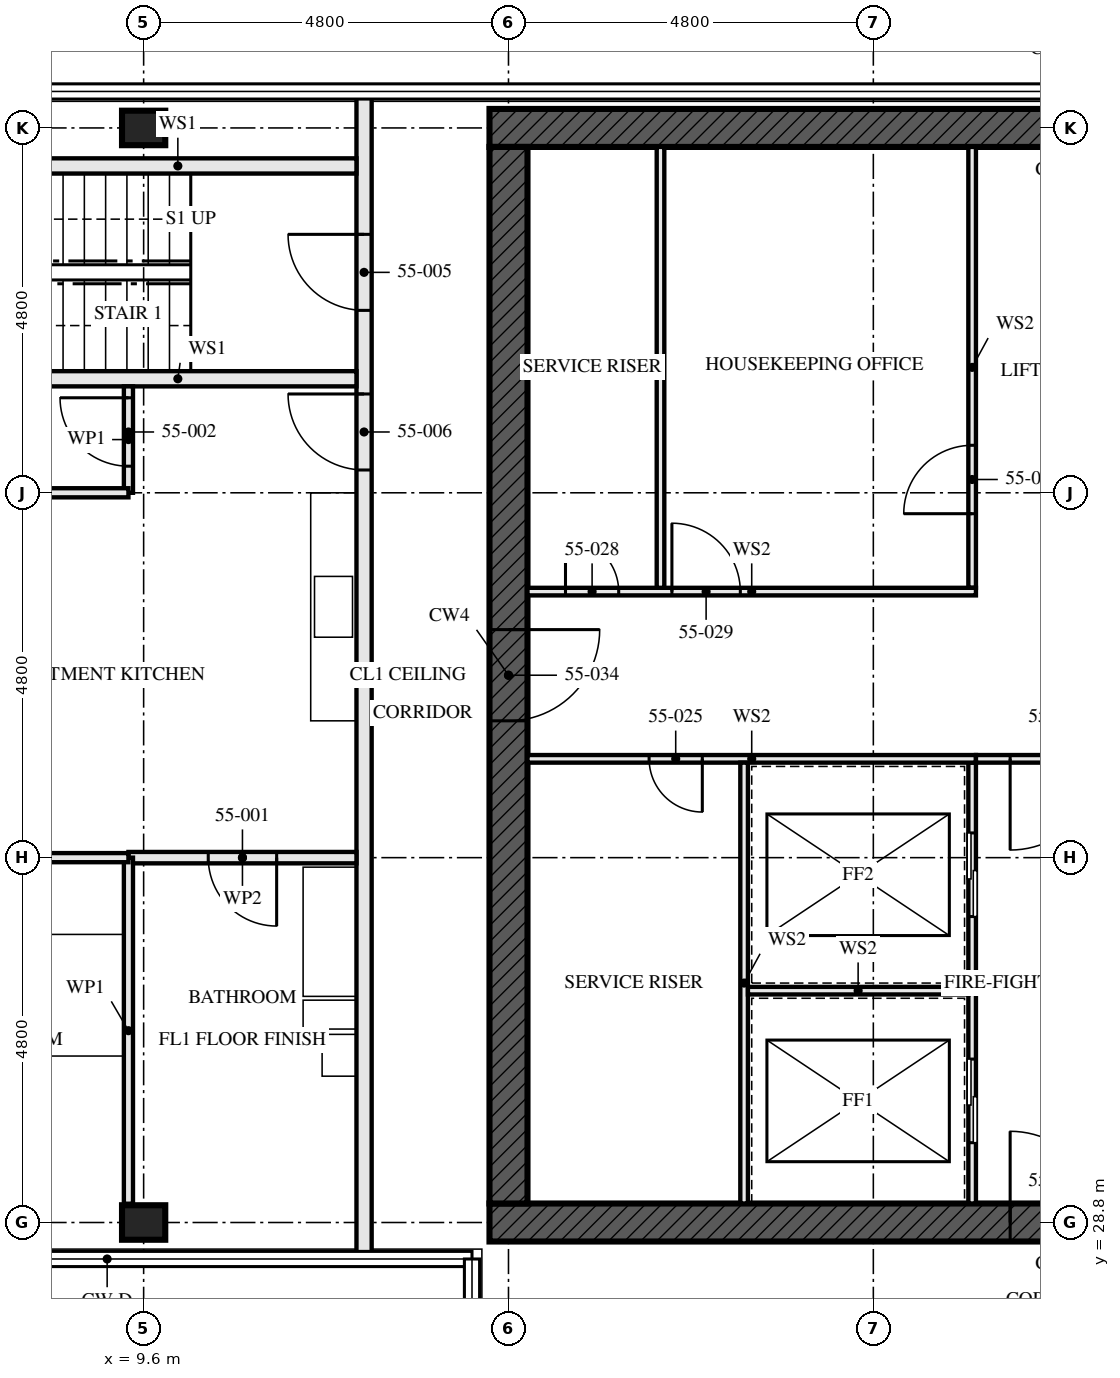
"""IFC4 building model, lengths in metres.
Left out: names, types, materials, properties, quantities, classifications, styles, units other than length and angle.
Written with IfcOpenShell. Run it as: python <this file> out.ifc"""

import sys

from ifc_helpers import new_model, si_unit, direction, frame, frame_2d, origin, origin_2d, place, context, subcontext, project, spatial, rectangle, i_section, extrude, element, fill, save


model = new_model("IFC4")
c1 = context("Model", 3, precision=1e-05, world=origin(), true_north=direction((0.0, 1.0)))
c2 = subcontext(c1, "Body", "Model", "MODEL_VIEW")
j1 = project(units=[si_unit("LENGTHUNIT", "METRE"), si_unit("PLANEANGLEUNIT", "RADIAN")], contexts=[c1])
p1 = place(None, origin())
s1 = spatial("IfcSite", under=j1, at=p1, CompositionType="ELEMENT")
p2 = place(p1, origin())
s2 = spatial("IfcBuilding", under=s1, at=p2, CompositionType="ELEMENT")
p3 = place(p2, frame((0.0, 0.0, 201.5)))
s3 = spatial("IfcBuildingStorey", under=s2, at=p3, CompositionType="ELEMENT", Elevation=201.5)
for number, where, z_axis, x_axis in (
    (1, (9.6, 28.8, 0.0), (0.0, 0.0, 1.0), (0.0, 1.0, 0.0)),
    (2, (9.6, 43.2, 0.0), (0.0, 0.0, 1.0), (0.0, 1.0, 0.0)),
):
    element("IfcColumn", number, at=place(p3, frame(where, z_axis=z_axis, x_axis=x_axis)), inside=s3, PredefinedType="COLUMN", context=c2, shape_type="SweptSolid", body=[
        extrude(i_section(OverallWidth=0.454, OverallDepth=0.569, WebThickness=0.078, FlangeThickness=0.125, FilletRadius=0.015, at=origin_2d()), origin(), (0.0, 0.0, 1.0), 3.5),
    ])
p4 = place(p3, frame((14.15, 28.8, -0.17), z_axis=(0.0, 0.0, 1.0), x_axis=(1.0, 0.0, 0.0)))
e3 = element("IfcWall", 3, at=p4, inside=s3, PredefinedType="SHEAR", context=c2, shape_type="SweptSolid", body=[
    extrude(rectangle(XDim=14.9, YDim=0.5, at=frame_2d((7.45, 0.0))), origin(), (0.0, 0.0, 1.0), 3.5),
])
p5 = place(p4, frame((6.85, 0.0, 0.17)))
e4 = element("IfcOpeningElement", 4, at=p5, cuts=e3, PredefinedType="OPENING", context=c2, shape_type="SweptSolid", body=[
    extrude(rectangle(XDim=1.2, YDim=2.1, at=frame_2d((0.6, 1.05))), frame((0.0, 0.26, 0.0), z_axis=(0.0, -1.0, 0.0), x_axis=(1.0, 0.0, 0.0)), (0.0, 0.0, 1.0), 0.521),
])
p6 = place(p3, frame((29.05, 43.2, -0.17), z_axis=(0.0, 0.0, 1.0), x_axis=(-1.0, 0.0, 0.0)))
e5 = element("IfcWall", 5, at=p6, inside=s3, PredefinedType="SHEAR", context=c2, shape_type="SweptSolid", body=[
    extrude(rectangle(XDim=14.9, YDim=0.5, at=frame_2d((7.45, 0.0))), origin(), (0.0, 0.0, 1.0), 3.5),
])
p7 = place(p3, frame((14.4, 42.95, -0.17), z_axis=(0.0, 0.0, 1.0), x_axis=(0.0, -1.0, 0.0)))
e6 = element("IfcWall", 6, at=p7, inside=s3, PredefinedType="SHEAR", context=c2, shape_type="SweptSolid", body=[
    extrude(rectangle(XDim=13.9, YDim=0.5, at=frame_2d((6.95, 0.0))), origin(), (0.0, 0.0, 1.0), 3.5),
])
p8 = place(p7, frame((6.35, 0.0, 0.17)))
e7 = element("IfcOpeningElement", 7, at=p8, cuts=e6, PredefinedType="OPENING", context=c2, shape_type="SweptSolid", body=[
    extrude(rectangle(XDim=1.2, YDim=2.1, at=frame_2d((0.6, 1.05))), frame((0.0, 0.26, 0.0), z_axis=(0.0, -1.0, 0.0), x_axis=(1.0, 0.0, 0.0)), (0.0, 0.0, 1.0), 0.521),
])
for number, where, z_axis, x_axis in (
    (8, (7.7, 42.7, 0.0), (0.0, 0.0, 1.0), (1.0, 0.0, 0.0)),
    (9, (7.7, 39.9, 0.0), (0.0, 0.0, 1.0), (1.0, 0.0, 0.0)),
):
    element("IfcWall", number, at=place(p3, frame(where, z_axis=z_axis, x_axis=x_axis)), inside=s3, PredefinedType="SOLIDWALL", context=c2, shape_type="SweptSolid", body=[
        extrude(rectangle(XDim=4.7, YDim=0.2, at=frame_2d((2.35, 0.0))), origin(), (0.0, 0.0, 1.0), 2.99),
    ])
p9 = place(p3, frame((9.4, 33.6, 0.0), z_axis=(0.0, 0.0, 1.0), x_axis=(1.0, 0.0, 0.0)))
e10 = element("IfcWall", 10, at=p9, inside=s3, PredefinedType="PARTITIONING", context=c2, shape_type="SweptSolid", body=[
    extrude(rectangle(XDim=3.0, YDim=0.15, at=frame_2d((1.5, 0.0))), origin(), (0.0, 0.0, 1.0), 2.55),
])
p10 = place(p9, frame((1.05, 0.0, 0.0)))
e11 = element("IfcOpeningElement", 11, at=p10, cuts=e10, PredefinedType="OPENING", context=c2, shape_type="SweptSolid", body=[
    extrude(rectangle(XDim=0.9, YDim=2.1, at=frame_2d((0.45, 1.05))), frame((0.0, 0.085, 0.0), z_axis=(0.0, -1.0, 0.0), x_axis=(1.0, 0.0, 0.0)), (0.0, 0.0, 1.0), 0.171),
])
p11 = place(p3, frame((9.4, 39.8, 0.0), z_axis=(0.0, 0.0, 1.0), x_axis=(0.0, -1.0, 0.0)))
e12 = element("IfcWall", 12, at=p11, inside=s3, PredefinedType="PARTITIONING", context=c2, shape_type="SweptSolid", body=[
    extrude(rectangle(XDim=1.4, YDim=0.12, at=frame_2d((0.7, 0.0))), origin(), (0.0, 0.0, 1.0), 3.33),
])
p12 = place(p11, frame((0.15, 0.0, 0.0)))
e13 = element("IfcOpeningElement", 13, at=p12, cuts=e12, PredefinedType="OPENING", context=c2, shape_type="SweptSolid", body=[
    extrude(rectangle(XDim=0.9, YDim=2.1, at=frame_2d((0.45, 1.05))), frame((0.0, 0.071, 0.0), z_axis=(0.0, -1.0, 0.0), x_axis=(1.0, 0.0, 0.0)), (0.0, 0.0, 1.0), 0.141),
])
p13 = place(p3, frame((9.4, 33.6, 0.0), z_axis=(0.0, 0.0, 1.0), x_axis=(0.0, -1.0, 0.0)))
e14 = element("IfcWall", 14, at=p13, inside=s3, PredefinedType="PARTITIONING", context=c2, shape_type="SweptSolid", body=[
    extrude(rectangle(XDim=4.553, YDim=0.12, at=frame_2d((2.276, 0.0))), origin(), (0.0, 0.0, 1.0), 3.33),
])
p14 = place(p3, frame((5.12, 38.4, 0.0), z_axis=(0.0, 0.0, 1.0), x_axis=(1.0, 0.0, 0.0)))
e15 = element("IfcWall", 15, at=p14, inside=s3, PredefinedType="PARTITIONING", context=c2, shape_type="SweptSolid", body=[
    extrude(rectangle(XDim=4.28, YDim=0.12, at=frame_2d((2.14, 0.0))), origin(), (0.0, 0.0, 1.0), 2.55),
])
p15 = place(p3, frame((5.12, 33.6, 0.0), z_axis=(0.0, 0.0, 1.0), x_axis=(1.0, 0.0, 0.0)))
e16 = element("IfcWall", 16, at=p15, inside=s3, PredefinedType="PARTITIONING", context=c2, shape_type="SweptSolid", body=[
    extrude(rectangle(XDim=4.28, YDim=0.12, at=frame_2d((2.14, 0.0))), origin(), (0.0, 0.0, 1.0), 2.55),
])
p16 = place(p15, frame((1.93, 0.0, 0.0)))
e17 = element("IfcOpeningElement", 17, at=p16, cuts=e16, PredefinedType="OPENING", context=c2, shape_type="SweptSolid", body=[
    extrude(rectangle(XDim=0.9, YDim=2.1, at=frame_2d((0.45, 1.05))), frame((0.0, 0.071, 0.0), z_axis=(0.0, -1.0, 0.0), x_axis=(1.0, 0.0, 0.0)), (0.0, 0.0, 1.0), 0.141),
])
p17 = place(p3, frame((12.5, 43.655, 0.0), z_axis=(0.0, 0.0, 1.0), x_axis=(0.0, -1.0, 0.0)))
e18 = element("IfcWall", 18, at=p17, inside=s3, PredefinedType="PARTITIONING", context=c2, shape_type="SweptSolid", body=[
    extrude(rectangle(XDim=15.31, YDim=0.2, at=frame_2d((7.655, 0.0))), origin(), (0.0, 0.0, 1.0), 2.32),
])
p18 = place(p17, frame((1.855, 0.0, 0.0)))
e19 = element("IfcOpeningElement", 19, at=p18, cuts=e18, PredefinedType="OPENING", context=c2, shape_type="SweptSolid", body=[
    extrude(rectangle(XDim=1.0, YDim=2.1, at=frame_2d((0.5, 1.05))), frame((0.0, 0.111, 0.0), z_axis=(0.0, -1.0, 0.0), x_axis=(1.0, 0.0, 0.0)), (0.0, 0.0, 1.0), 0.221),
])
p19 = place(p17, frame((3.955, 0.0, 0.0)))
e20 = element("IfcOpeningElement", 20, at=p19, cuts=e18, PredefinedType="OPENING", context=c2, shape_type="SweptSolid", body=[
    extrude(rectangle(XDim=1.0, YDim=2.1, at=frame_2d((0.5, 1.05))), frame((0.0, 0.111, 0.0), z_axis=(0.0, -1.0, 0.0), x_axis=(1.0, 0.0, 0.0)), (0.0, 0.0, 1.0), 0.221),
])
p20 = place(p3, frame((16.4, 37.15, 0.0), z_axis=(0.0, 0.0, 1.0), x_axis=(0.0, 1.0, 0.0)))
e21 = element("IfcWall", 21, at=p20, inside=s3, PredefinedType="SOLIDWALL", context=c2, shape_type="SweptSolid", body=[
    extrude(rectangle(XDim=5.8, YDim=0.1, at=frame_2d((2.9, 0.0))), origin(), (0.0, 0.0, 1.0), 3.33),
])
p21 = place(p3, frame((20.5, 29.05, 0.0), z_axis=(0.0, 0.0, 1.0), x_axis=(0.0, 1.0, 0.0)))
e22 = element("IfcWall", 22, at=p21, inside=s3, PredefinedType="SOLIDWALL", context=c2, shape_type="SweptSolid", body=[
    extrude(rectangle(XDim=5.8, YDim=0.1, at=frame_2d((2.9, 0.0))), origin(), (0.0, 0.0, 1.0), 3.33),
])
p22 = place(p21, frame((0.8, 0.0, 0.0)))
e23 = element("IfcOpeningElement", 23, at=p22, cuts=e22, PredefinedType="OPENING", context=c2, shape_type="SweptSolid", body=[
    extrude(rectangle(XDim=1.1, YDim=2.3, at=frame_2d((0.55, 1.15))), frame((0.0, 0.061, 0.0), z_axis=(0.0, -1.0, 0.0), x_axis=(1.0, 0.0, 0.0)), (0.0, 0.0, 1.0), 0.121),
])
p23 = place(p21, frame((3.775, 0.0, 0.0)))
e24 = element("IfcOpeningElement", 24, at=p23, cuts=e22, PredefinedType="OPENING", context=c2, shape_type="SweptSolid", body=[
    extrude(rectangle(XDim=1.1, YDim=2.3, at=frame_2d((0.55, 1.15))), frame((0.0, 0.061, 0.0), z_axis=(0.0, -1.0, 0.0), x_axis=(1.0, 0.0, 0.0)), (0.0, 0.0, 1.0), 0.121),
])
p24 = place(p3, frame((20.5, 37.15, 0.0), z_axis=(0.0, 0.0, 1.0), x_axis=(0.0, 1.0, 0.0)))
e25 = element("IfcWall", 25, at=p24, inside=s3, PredefinedType="SOLIDWALL", context=c2, shape_type="SweptSolid", body=[
    extrude(rectangle(XDim=5.8, YDim=0.1, at=frame_2d((2.9, 0.0))), origin(), (0.0, 0.0, 1.0), 3.33),
])
p25 = place(p24, frame((0.975, 0.0, 0.0)))
e26 = element("IfcOpeningElement", 26, at=p25, cuts=e25, PredefinedType="OPENING", context=c2, shape_type="SweptSolid", body=[
    extrude(rectangle(XDim=0.9, YDim=2.1, at=frame_2d((0.45, 1.05))), frame((0.0, 0.061, 0.0), z_axis=(0.0, -1.0, 0.0), x_axis=(1.0, 0.0, 0.0)), (0.0, 0.0, 1.0), 0.121),
])
p26 = place(p3, frame((14.65, 34.9, 0.0), z_axis=(0.0, 0.0, 1.0), x_axis=(1.0, 0.0, 0.0)))
e27 = element("IfcWall", 27, at=p26, inside=s3, PredefinedType="SOLIDWALL", context=c2, shape_type="SweptSolid", body=[
    extrude(rectangle(XDim=5.9, YDim=0.1, at=frame_2d((2.95, 0.0))), origin(), (0.0, 0.0, 1.0), 3.33),
])
p27 = place(p26, frame((1.6, 0.0, 0.0)))
e28 = element("IfcOpeningElement", 28, at=p27, cuts=e27, PredefinedType="OPENING", context=c2, shape_type="SweptSolid", body=[
    extrude(rectangle(XDim=0.7, YDim=2.1, at=frame_2d((0.35, 1.05))), frame((0.0, 0.061, 0.0), z_axis=(0.0, -1.0, 0.0), x_axis=(1.0, 0.0, 0.0)), (0.0, 0.0, 1.0), 0.121),
])
p28 = place(p3, frame((14.65, 37.1, 0.0), z_axis=(0.0, 0.0, 1.0), x_axis=(1.0, 0.0, 0.0)))
e29 = element("IfcWall", 29, at=p28, inside=s3, PredefinedType="SOLIDWALL", context=c2, shape_type="SweptSolid", body=[
    extrude(rectangle(XDim=5.9, YDim=0.1, at=frame_2d((2.95, 0.0))), origin(), (0.0, 0.0, 1.0), 3.33),
])
p29 = place(p28, frame((0.5, 0.0, 0.0)))
e30 = element("IfcOpeningElement", 30, at=p29, cuts=e29, PredefinedType="OPENING", context=c2, shape_type="SweptSolid", body=[
    extrude(rectangle(XDim=0.7, YDim=2.1, at=frame_2d((0.35, 1.05))), frame((0.0, 0.061, 0.0), z_axis=(0.0, -1.0, 0.0), x_axis=(1.0, 0.0, 0.0)), (0.0, 0.0, 1.0), 0.121),
])
p30 = place(p28, frame((1.9, 0.0, 0.0)))
e31 = element("IfcOpeningElement", 31, at=p30, cuts=e29, PredefinedType="OPENING", context=c2, shape_type="SweptSolid", body=[
    extrude(rectangle(XDim=0.9, YDim=2.1, at=frame_2d((0.45, 1.05))), frame((0.0, 0.061, 0.0), z_axis=(0.0, -1.0, 0.0), x_axis=(1.0, 0.0, 0.0)), (0.0, 0.0, 1.0), 0.121),
])
p31 = place(p3, frame((20.55, 34.9, 0.0), z_axis=(0.0, 0.0, 1.0), x_axis=(1.0, 0.0, 0.0)))
e32 = element("IfcWall", 32, at=p31, inside=s3, PredefinedType="SOLIDWALL", context=c2, shape_type="SweptSolid", body=[
    extrude(rectangle(XDim=2.5, YDim=0.1, at=frame_2d((1.25, 0.0))), origin(), (0.0, 0.0, 1.0), 3.33),
])
p32 = place(p31, frame((0.45, 0.0, 0.0)))
e33 = element("IfcOpeningElement", 33, at=p32, cuts=e32, PredefinedType="OPENING", context=c2, shape_type="SweptSolid", body=[
    extrude(rectangle(XDim=1.2, YDim=2.1, at=frame_2d((0.6, 1.05))), frame((0.0, 0.061, 0.0), z_axis=(0.0, -1.0, 0.0), x_axis=(1.0, 0.0, 0.0)), (0.0, 0.0, 1.0), 0.121),
])
p33 = place(p3, frame((17.5, 29.05, 0.0), z_axis=(0.0, 0.0, 1.0), x_axis=(0.0, 1.0, 0.0)))
e34 = element("IfcWall", 34, at=p33, inside=s3, PredefinedType="SOLIDWALL", context=c2, shape_type="SweptSolid", body=[
    extrude(rectangle(XDim=5.8, YDim=0.1, at=frame_2d((2.9, 0.0))), origin(), (0.0, 0.0, 1.0), 3.33),
])
p34 = place(p3, frame((17.55, 31.85, 0.0), z_axis=(0.0, 0.0, 1.0), x_axis=(1.0, 0.0, 0.0)))
e35 = element("IfcWall", 35, at=p34, inside=s3, PredefinedType="SOLIDWALL", context=c2, shape_type="SweptSolid", body=[
    extrude(rectangle(XDim=2.9, YDim=0.1, at=frame_2d((1.45, 0.0))), origin(), (0.0, 0.0, 1.0), 3.33),
])
p35 = place(p10, frame((0.9, 0.0, 0.0), z_axis=(0.0, 0.0, 1.0), x_axis=(-1.0, 0.0, 0.0)))
e36 = element("IfcDoor", 36, at=p35, inside=s3, OperationType="SINGLE_SWING_RIGHT", PredefinedType="DOOR", context=c2, shape_type="SweptSolid", body=[
    extrude(rectangle(XDim=0.9, YDim=2.1, at=frame_2d((0.45, 1.05))), frame((0.0, 0.022, 0.0), z_axis=(0.0, -1.0, 0.0), x_axis=(1.0, 0.0, 0.0)), (0.0, 0.0, 1.0), 0.044),
])
fill(e11, e36)
p36 = place(p12, frame((0.9, 0.0, 0.0), z_axis=(0.0, 0.0, 1.0), x_axis=(-1.0, 0.0, 0.0)))
e37 = element("IfcDoor", 37, at=p36, inside=s3, OperationType="SINGLE_SWING_LEFT", PredefinedType="DOOR", context=c2, shape_type="SweptSolid", body=[
    extrude(rectangle(XDim=0.9, YDim=2.1, at=frame_2d((0.45, 1.05))), frame((0.0, 0.022, 0.0), z_axis=(0.0, -1.0, 0.0), x_axis=(1.0, 0.0, 0.0)), (0.0, 0.0, 1.0), 0.044),
])
fill(e13, e37)
p37 = place(p18, frame((1.0, 0.0, 0.0), z_axis=(0.0, 0.0, 1.0), x_axis=(-1.0, 0.0, 0.0)))
e38 = element("IfcDoor", 38, at=p37, inside=s3, OperationType="SINGLE_SWING_LEFT", PredefinedType="DOOR", context=c2, shape_type="SweptSolid", body=[
    extrude(rectangle(XDim=1.0, YDim=2.1, at=frame_2d((0.5, 1.05))), frame((0.0, 0.032, 0.0), z_axis=(0.0, -1.0, 0.0), x_axis=(1.0, 0.0, 0.0)), (0.0, 0.0, 1.0), 0.064),
])
fill(e19, e38)
p38 = place(p19, frame((1.0, 0.0, 0.0), z_axis=(0.0, 0.0, 1.0), x_axis=(-1.0, 0.0, 0.0)))
e39 = element("IfcDoor", 39, at=p38, inside=s3, OperationType="SINGLE_SWING_LEFT", PredefinedType="DOOR", context=c2, shape_type="SweptSolid", body=[
    extrude(rectangle(XDim=1.0, YDim=2.1, at=frame_2d((0.5, 1.05))), frame((0.0, 0.027, 0.0), z_axis=(0.0, -1.0, 0.0), x_axis=(1.0, 0.0, 0.0)), (0.0, 0.0, 1.0), 0.054),
])
fill(e20, e39)
p39 = place(p22, origin())
e40 = element("IfcDoor", 40, at=p39, inside=s3, OperationType="SLIDING_TO_LEFT", PredefinedType="DOOR", context=c2, shape_type="SweptSolid", body=[
    extrude(rectangle(XDim=1.1, YDim=2.3, at=frame_2d((0.55, 1.15))), frame((0.0, 0.05, 0.0), z_axis=(0.0, -1.0, 0.0), x_axis=(1.0, 0.0, 0.0)), (0.0, 0.0, 1.0), 0.1),
])
fill(e23, e40)
p40 = place(p23, origin())
e41 = element("IfcDoor", 41, at=p40, inside=s3, OperationType="SLIDING_TO_LEFT", PredefinedType="DOOR", context=c2, shape_type="SweptSolid", body=[
    extrude(rectangle(XDim=1.1, YDim=2.3, at=frame_2d((0.55, 1.15))), frame((0.0, 0.05, 0.0), z_axis=(0.0, -1.0, 0.0), x_axis=(1.0, 0.0, 0.0)), (0.0, 0.0, 1.0), 0.1),
])
fill(e24, e41)
p41 = place(p25, origin())
e42 = element("IfcDoor", 42, at=p41, inside=s3, OperationType="SINGLE_SWING_RIGHT", PredefinedType="DOOR", context=c2, shape_type="SweptSolid", body=[
    extrude(rectangle(XDim=0.9, YDim=2.1, at=frame_2d((0.45, 1.05))), frame((0.0, 0.027, 0.0), z_axis=(0.0, -1.0, 0.0), x_axis=(1.0, 0.0, 0.0)), (0.0, 0.0, 1.0), 0.054),
])
fill(e26, e42)
p42 = place(p27, frame((0.7, 0.0, 0.0), z_axis=(0.0, 0.0, 1.0), x_axis=(-1.0, 0.0, 0.0)))
e43 = element("IfcDoor", 43, at=p42, inside=s3, OperationType="SINGLE_SWING_RIGHT", PredefinedType="DOOR", context=c2, shape_type="SweptSolid", body=[
    extrude(rectangle(XDim=0.7, YDim=2.1, at=frame_2d((0.35, 1.05))), frame((0.0, 0.027, 0.0), z_axis=(0.0, -1.0, 0.0), x_axis=(1.0, 0.0, 0.0)), (0.0, 0.0, 1.0), 0.054),
])
fill(e28, e43)
p43 = place(p29, origin())
e44 = element("IfcDoor", 44, at=p43, inside=s3, OperationType="SINGLE_SWING_RIGHT", PredefinedType="DOOR", context=c2, shape_type="SweptSolid", body=[
    extrude(rectangle(XDim=0.7, YDim=2.1, at=frame_2d((0.35, 1.05))), frame((0.0, 0.027, 0.0), z_axis=(0.0, -1.0, 0.0), x_axis=(1.0, 0.0, 0.0)), (0.0, 0.0, 1.0), 0.054),
])
fill(e30, e44)
p44 = place(p30, origin())
e45 = element("IfcDoor", 45, at=p44, inside=s3, OperationType="SINGLE_SWING_RIGHT", PredefinedType="DOOR", context=c2, shape_type="SweptSolid", body=[
    extrude(rectangle(XDim=0.9, YDim=2.1, at=frame_2d((0.45, 1.05))), frame((0.0, 0.027, 0.0), z_axis=(0.0, -1.0, 0.0), x_axis=(1.0, 0.0, 0.0)), (0.0, 0.0, 1.0), 0.054),
])
fill(e31, e45)
p45 = place(p32, frame((1.2, 0.0, 0.0), z_axis=(0.0, 0.0, 1.0), x_axis=(-1.0, 0.0, 0.0)))
e46 = element("IfcDoor", 46, at=p45, inside=s3, OperationType="SINGLE_SWING_LEFT", PredefinedType="DOOR", context=c2, shape_type="SweptSolid", body=[
    extrude(rectangle(XDim=1.2, YDim=2.1, at=frame_2d((0.6, 1.05))), frame((0.0, 0.027, 0.0), z_axis=(0.0, -1.0, 0.0), x_axis=(1.0, 0.0, 0.0)), (0.0, 0.0, 1.0), 0.054),
])
fill(e33, e46)
p46 = place(p5, origin())
e47 = element("IfcDoor", 47, at=p46, inside=s3, OperationType="SINGLE_SWING_LEFT", PredefinedType="DOOR", context=c2, shape_type="SweptSolid", body=[
    extrude(rectangle(XDim=1.2, YDim=2.1, at=frame_2d((0.6, 1.05))), frame((0.0, 0.027, 0.0), z_axis=(0.0, -1.0, 0.0), x_axis=(1.0, 0.0, 0.0)), (0.0, 0.0, 1.0), 0.054),
])
fill(e4, e47)
p47 = place(p8, origin())
e48 = element("IfcDoor", 48, at=p47, inside=s3, OperationType="SINGLE_SWING_LEFT", PredefinedType="DOOR", context=c2, shape_type="SweptSolid", body=[
    extrude(rectangle(XDim=1.2, YDim=2.1, at=frame_2d((0.6, 1.05))), frame((0.0, 0.027, 0.0), z_axis=(0.0, -1.0, 0.0), x_axis=(1.0, 0.0, 0.0)), (0.0, 0.0, 1.0), 0.054),
])
fill(e7, e48)
save(model, sys.argv[1])
